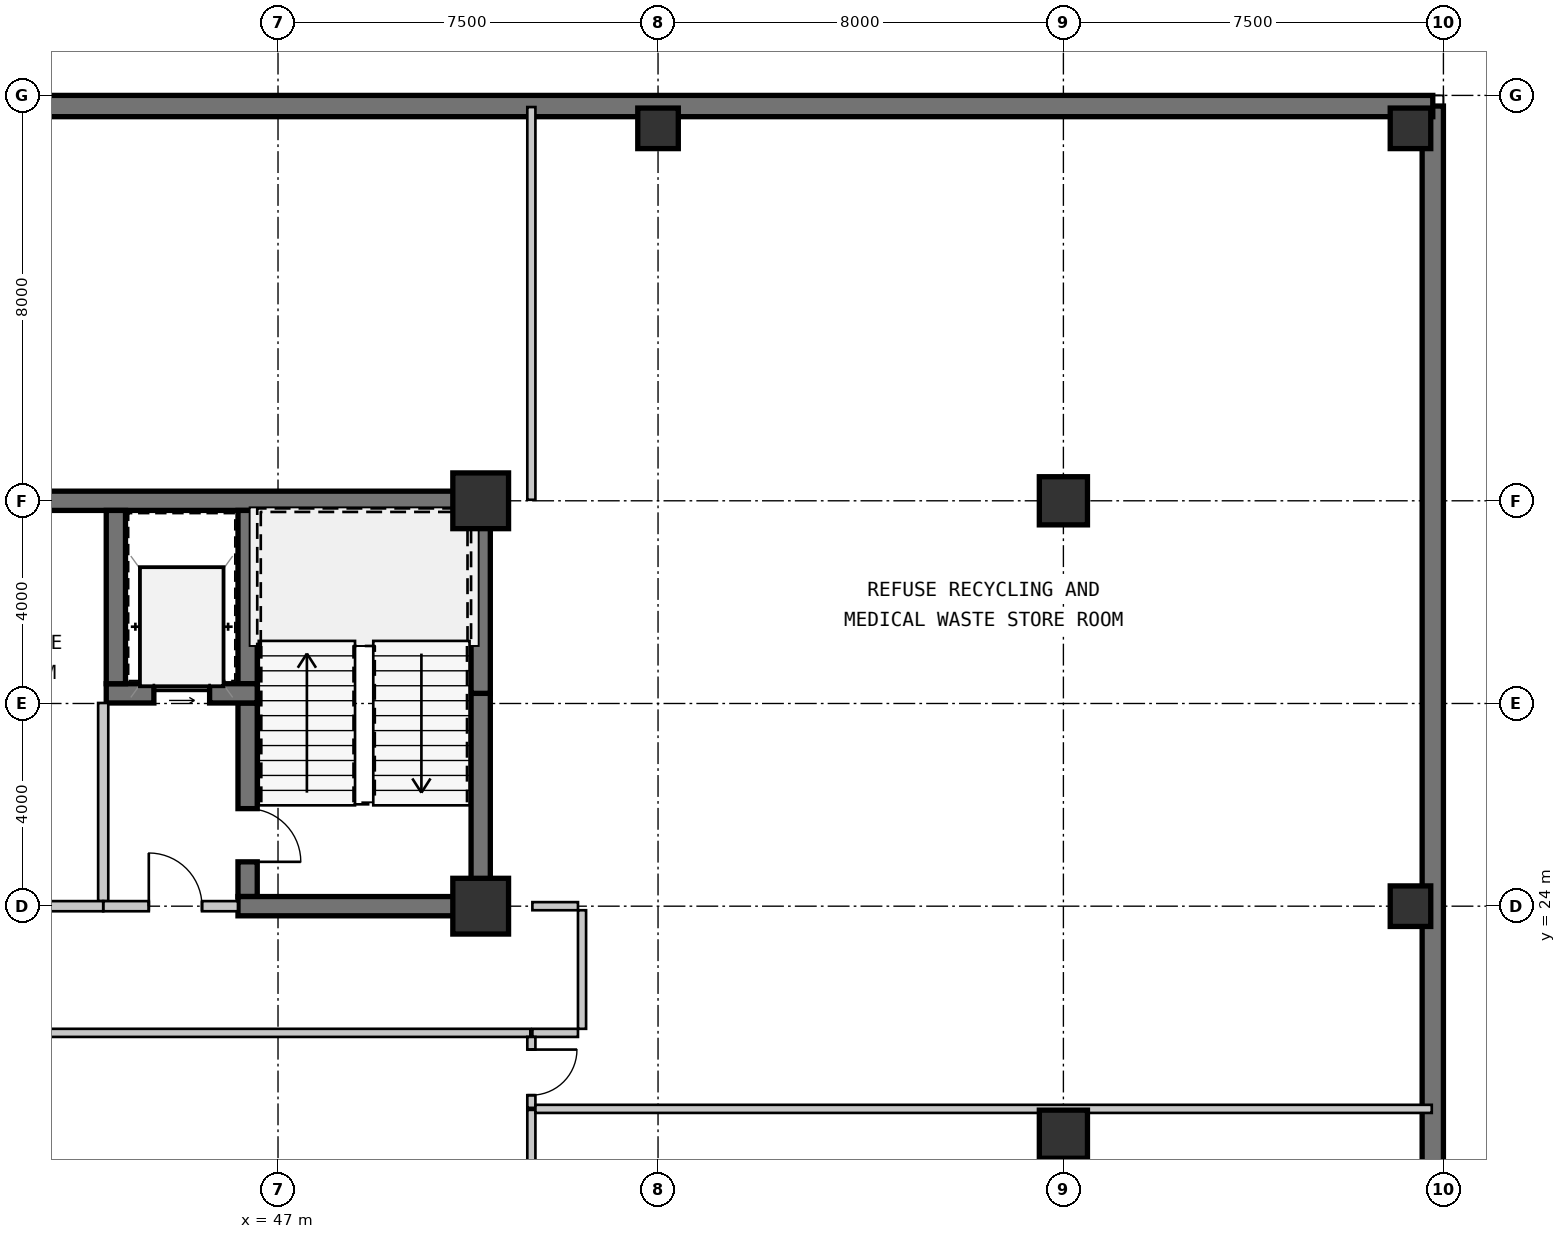
"""IFC4 building model, lengths in metres.
Left out: names, types, materials, properties, quantities, classifications, styles, units other than length and angle.
Written with IfcOpenShell. Run it as: python <this file> out.ifc"""

import sys

from ifc_helpers import new_model, si_unit, direction, frame, frame_2d, origin, origin_2d, place, context, subcontext, project, spatial, rectangle, extrude, source, transform, mapped, element, fill, save


model = new_model("IFC4")
c1 = context("Model", 3, precision=1e-05, world=origin(), true_north=direction((0.0, 1.0)))
c2 = subcontext(c1, "Body", "Model", "MODEL_VIEW")
j1 = project(units=[si_unit("LENGTHUNIT", "METRE"), si_unit("PLANEANGLEUNIT", "RADIAN")], contexts=[c1])
p1 = place(None, origin())
s1 = spatial("IfcSite", under=j1, at=p1, CompositionType="ELEMENT")
p2 = place(p1, origin())
s2 = spatial("IfcBuilding", under=s1, at=p2, CompositionType="ELEMENT")
p3 = place(p2, frame((0.0, 0.0, -4.0)))
s3 = spatial("IfcBuildingStorey", under=s2, at=p3, CompositionType="ELEMENT", Elevation=-4.0)
m1 = source(origin(), c2, "Body", "SweptSolid", [
    extrude(rectangle(XDim=1.1, YDim=1.1, at=origin_2d()), origin(), (0.0, 0.0, 1.0), 4.0),
])
for number, where, z_axis, x_axis in (
    (1, (51.0, 24.0, 0.0), (0.0, 0.0, 1.0), (1.0, 0.0, 0.0)),
    (2, (51.0, 32.0, 0.0), (0.0, 0.0, 1.0), (1.0, 0.0, 0.0)),
):
    element("IfcColumn", number, at=place(p3, frame(where, z_axis=z_axis, x_axis=x_axis)), inside=s3, PredefinedType="COLUMN", context=c2, shape_type="MappedRepresentation", body=[
        mapped(m1, transform((0.0, 0.0, 0.0), scale=1.0)),
    ])
m2 = source(origin(), c2, "Body", "SweptSolid", [
    extrude(rectangle(XDim=0.95, YDim=0.95, at=origin_2d()), origin(), (0.0, 0.0, 1.0), 4.0),
])
for number, where, z_axis, x_axis in (
    (3, (62.5, 19.5, 0.0), (0.0, 0.0, 1.0), (1.0, 0.0, 0.0)),
    (4, (62.5, 32.0, 0.0), (0.0, 0.0, 1.0), (1.0, 0.0, 0.0)),
):
    element("IfcColumn", number, at=place(p3, frame(where, z_axis=z_axis, x_axis=x_axis)), inside=s3, PredefinedType="COLUMN", context=c2, shape_type="MappedRepresentation", body=[
        mapped(m2, transform((0.0, 0.0, 0.0), scale=1.0)),
    ])
m3 = source(origin(), c2, "Body", "SweptSolid", [
    extrude(rectangle(XDim=0.8, YDim=0.8, at=origin_2d()), origin(), (0.0, 0.0, 1.0), 4.0),
])
for number, where, z_axis, x_axis in (
    (5, (69.35, 24.0, 0.0), (0.0, 0.0, 1.0), (1.0, 0.0, 0.0)),
    (6, (69.35, 39.35, 0.0), (0.0, 0.0, 1.0), (1.0, 0.0, 0.0)),
    (7, (54.5, 39.35, 0.0), (0.0, 0.0, 1.0), (1.0, 0.0, 0.0)),
):
    element("IfcColumn", number, at=place(p3, frame(where, z_axis=z_axis, x_axis=x_axis)), inside=s3, PredefinedType="COLUMN", context=c2, shape_type="MappedRepresentation", body=[
        mapped(m3, transform((0.0, 0.0, 0.0), scale=1.0)),
    ])
m4 = source(origin(), c2, "Body", "SweptSolid", [
    extrude(rectangle(XDim=39.58, YDim=0.42, at=frame_2d((19.79, 0.0))), origin(), (0.0, 0.0, 1.0), 3.74),
])
p4 = place(p3, frame((69.79, 0.21, 0.0), z_axis=(0.0, 0.0, 1.0), x_axis=(0.0, 1.0, 0.0)))
e8 = element("IfcWall", 8, at=p4, inside=s3, PredefinedType="SOLIDWALL", context=c2, shape_type="MappedRepresentation", body=[
    mapped(m4, transform((0.0, 0.0, 0.0), scale=1.0)),
])
m5 = source(origin(), c2, "Body", "SweptSolid", [
    extrude(rectangle(XDim=69.58, YDim=0.42, at=frame_2d((34.79, 0.0))), origin(), (0.0, 0.0, 1.0), 3.74),
])
p5 = place(p3, frame((69.79, 39.79, 0.0), z_axis=(0.0, 0.0, 1.0), x_axis=(-1.0, 0.0, 0.0)))
e9 = element("IfcWall", 9, at=p5, inside=s3, PredefinedType="SOLIDWALL", context=c2, shape_type="MappedRepresentation", body=[
    mapped(m5, transform((0.0, 0.0, 0.0), scale=1.0)),
])
m6 = source(origin(), c2, "Body", "SweptSolid", [
    extrude(rectangle(XDim=11.99, YDim=0.38, at=frame_2d((5.995, 0.0))), origin(), (0.0, 0.0, 1.0), 3.74),
])
p6 = place(p3, frame((39.2, 32.0, 0.0), z_axis=(0.0, 0.0, 1.0), x_axis=(1.0, 0.0, 0.0)))
e10 = element("IfcWall", 10, at=p6, inside=s3, PredefinedType="SHEAR", context=c2, shape_type="MappedRepresentation", body=[
    mapped(m6, transform((0.0, 0.0, 0.0), scale=1.0)),
])
m7 = source(origin(), c2, "Body", "SweptSolid", [
    extrude(rectangle(XDim=4.01, YDim=0.38, at=frame_2d((2.005, 0.0))), origin(), (0.0, 0.0, 1.0), 3.74),
])
p7 = place(p3, frame((51.0, 24.19, 0.0), z_axis=(0.0, 0.0, 1.0), x_axis=(0.0, 1.0, 0.0)))
e11 = element("IfcWall", 11, at=p7, inside=s3, PredefinedType="SHEAR", context=c2, shape_type="MappedRepresentation", body=[
    mapped(m7, transform((0.0, 0.0, 0.0), scale=1.0)),
])
m8 = source(origin(), c2, "Body", "SweptSolid", [
    extrude(rectangle(XDim=3.61, YDim=0.38, at=frame_2d((1.805, 0.0))), origin(), (0.0, 0.0, 1.0), 3.74),
])
p8 = place(p3, frame((51.0, 28.2, 0.0), z_axis=(0.0, 0.0, 1.0), x_axis=(0.0, 1.0, 0.0)))
e12 = element("IfcWall", 12, at=p8, inside=s3, PredefinedType="SHEAR", context=c2, shape_type="MappedRepresentation", body=[
    mapped(m8, transform((0.0, 0.0, 0.0), scale=1.0)),
])
m9 = source(origin(), c2, "Body", "SweptSolid", [
    extrude(rectangle(XDim=3.42, YDim=0.38, at=frame_2d((1.71, 0.0))), origin(), (0.0, 0.0, 1.0), 3.74),
])
p9 = place(p3, frame((46.4, 31.81, 0.0), z_axis=(0.0, 0.0, 1.0), x_axis=(0.0, -1.0, 0.0)))
e13 = element("IfcWall", 13, at=p9, inside=s3, PredefinedType="SHEAR", context=c2, shape_type="MappedRepresentation", body=[
    mapped(m9, transform((0.0, 0.0, 0.0), scale=1.0)),
])
m10 = source(origin(), c2, "Body", "SweptSolid", [
    extrude(rectangle(XDim=3.82, YDim=0.38, at=frame_2d((1.91, 0.0))), origin(), (0.0, 0.0, 1.0), 3.74),
])
p10 = place(p3, frame((46.4, 28.01, 0.0), z_axis=(0.0, 0.0, 1.0), x_axis=(0.0, -1.0, 0.0)))
e14 = element("IfcWall", 14, at=p10, inside=s3, PredefinedType="SHEAR", context=c2, shape_type="MappedRepresentation", body=[
    mapped(m10, transform((0.0, 0.0, 0.0), scale=1.0)),
])
m11 = source(origin(), c2, "Body", "SweptSolid", [
    extrude(rectangle(XDim=1.05, YDim=2.1, at=frame_2d((0.525, 1.05))), frame((0.0, 0.2, 0.0), z_axis=(0.0, -1.0, 0.0), x_axis=(1.0, 0.0, 0.0)), (0.0, 0.0, 1.0), 0.4),
])
p11 = place(p10, frame((2.085, 0.0, 0.0)))
e15 = element("IfcOpeningElement", 15, at=p11, cuts=e14, PredefinedType="OPENING", context=c2, shape_type="MappedRepresentation", body=[
    mapped(m11, transform((0.0, 0.0, 0.0), scale=1.0)),
])
m12 = source(origin(), c2, "Body", "SweptSolid", [
    extrude(rectangle(XDim=4.98, YDim=0.38, at=frame_2d((2.49, 0.0))), origin(), (0.0, 0.0, 1.0), 3.74),
])
p12 = place(p3, frame((46.21, 24.0, 0.0), z_axis=(0.0, 0.0, 1.0), x_axis=(1.0, 0.0, 0.0)))
e16 = element("IfcWall", 16, at=p12, inside=s3, PredefinedType="SHEAR", context=c2, shape_type="MappedRepresentation", body=[
    mapped(m12, transform((0.0, 0.0, 0.0), scale=1.0)),
])
m13 = source(origin(), c2, "Body", "SweptSolid", [
    extrude(rectangle(XDim=2.98, YDim=0.38, at=frame_2d((1.49, 0.0))), origin(), (0.0, 0.0, 1.0), 3.74),
])
p13 = place(p3, frame((43.61, 28.2, 0.0), z_axis=(0.0, 0.0, 1.0), x_axis=(1.0, 0.0, 0.0)))
e17 = element("IfcWall", 17, at=p13, inside=s3, PredefinedType="SHEAR", context=c2, shape_type="MappedRepresentation", body=[
    mapped(m13, transform((0.0, 0.0, 0.0), scale=1.0)),
])
m14 = source(origin(), c2, "Body", "SweptSolid", [
    extrude(rectangle(XDim=1.1, YDim=2.15, at=frame_2d((0.55, 1.075))), frame((0.0, 0.2, 0.0), z_axis=(0.0, -1.0, 0.0), x_axis=(1.0, 0.0, 0.0)), (0.0, 0.0, 1.0), 0.4),
])
p14 = place(p13, frame((0.94, 0.0, 0.0)))
e18 = element("IfcOpeningElement", 18, at=p14, cuts=e17, PredefinedType="OPENING", context=c2, shape_type="MappedRepresentation", body=[
    mapped(m14, transform((0.0, 0.0, 0.0), scale=1.0)),
])
p15 = place(p3, frame((43.8, 31.81, 0.0), z_axis=(0.0, 0.0, 1.0), x_axis=(0.0, -1.0, 0.0)))
e19 = element("IfcWall", 19, at=p15, inside=s3, PredefinedType="SHEAR", context=c2, shape_type="MappedRepresentation", body=[
    mapped(m9, transform((0.0, 0.0, 0.0), scale=1.0)),
])
m15 = source(origin(), c2, "Body", "SweptSolid", [
    extrude(rectangle(XDim=3.91, YDim=0.2, at=frame_2d((1.955, 0.0))), origin(), (0.0, 0.0, 1.0), 3.74),
])
p16 = place(p3, frame((43.55, 28.01, 0.0), z_axis=(0.0, 0.0, 1.0), x_axis=(0.0, -1.0, 0.0)))
e20 = element("IfcWall", 20, at=p16, inside=s3, PredefinedType="SOLIDWALL", context=c2, shape_type="MappedRepresentation", body=[
    mapped(m15, transform((0.0, 0.0, 0.0), scale=1.0)),
])
m16 = source(origin(), c2, "Body", "SweptSolid", [
    extrude(rectangle(XDim=2.66, YDim=0.2, at=frame_2d((1.33, 0.0))), origin(), (0.0, 0.0, 1.0), 3.207),
])
p17 = place(p3, frame((43.55, 24.0, 0.0), z_axis=(0.0, 0.0, 1.0), x_axis=(1.0, 0.0, 0.0)))
e21 = element("IfcWall", 21, at=p17, inside=s3, PredefinedType="SOLIDWALL", context=c2, shape_type="MappedRepresentation", body=[
    mapped(m16, transform((0.0, 0.0, 0.0), scale=1.0)),
])
m17 = source(origin(), c2, "Body", "SweptSolid", [
    extrude(rectangle(XDim=1.05, YDim=2.1, at=frame_2d((0.525, 1.05))), frame((0.0, 0.11, 0.0), z_axis=(0.0, -1.0, 0.0), x_axis=(1.0, 0.0, 0.0)), (0.0, 0.0, 1.0), 0.22),
])
p18 = place(p17, frame((0.9, 0.0, 0.0)))
e22 = element("IfcOpeningElement", 22, at=p18, cuts=e21, PredefinedType="OPENING", context=c2, shape_type="MappedRepresentation", body=[
    mapped(m17, transform((0.0, 0.0, 0.0), scale=1.0)),
])
m18 = source(origin(), c2, "Body", "SweptSolid", [
    extrude(rectangle(XDim=4.35, YDim=0.2, at=frame_2d((2.175, 0.0))), origin(), (0.0, 0.0, 1.0), 3.207),
])
p19 = place(p3, frame((43.55, 24.0, 0.0), z_axis=(0.0, 0.0, 1.0), x_axis=(-1.0, 0.0, 0.0)))
e23 = element("IfcWall", 23, at=p19, inside=s3, PredefinedType="SOLIDWALL", context=c2, shape_type="MappedRepresentation", body=[
    mapped(m18, transform((0.0, 0.0, 0.0), scale=1.0)),
])
p20 = place(p19, frame((1.65, 0.0, 0.0)))
e24 = element("IfcOpeningElement", 24, at=p20, cuts=e23, PredefinedType="OPENING", context=c2, shape_type="MappedRepresentation", body=[
    mapped(m17, transform((0.0, 0.0, 0.0), scale=1.0)),
])
m19 = source(origin(), c2, "Body", "SweptSolid", [
    extrude(rectangle(XDim=36.959, YDim=0.16, at=frame_2d((18.48, 0.0))), origin(), (0.0, 0.0, 1.0), 3.74),
])
p21 = place(p3, frame((51.98, 21.5, 0.0), z_axis=(0.0, 0.0, 1.0), x_axis=(-1.0, 0.0, 0.0)))
e25 = element("IfcWall", 25, at=p21, inside=s3, PredefinedType="PARTITIONING", context=c2, shape_type="MappedRepresentation", body=[
    mapped(m19, transform((0.0, 0.0, 0.0), scale=1.0)),
])
m20 = source(origin(), c2, "Body", "SweptSolid", [
    extrude(rectangle(XDim=1.05, YDim=2.1, at=frame_2d((0.525, 1.05))), frame((0.0, 0.09, 0.0), z_axis=(0.0, -1.0, 0.0), x_axis=(1.0, 0.0, 0.0)), (0.0, 0.0, 1.0), 0.18),
])
p22 = place(p21, frame((17.955, 0.0, 0.0)))
e26 = element("IfcOpeningElement", 26, at=p22, cuts=e25, PredefinedType="OPENING", context=c2, shape_type="MappedRepresentation", body=[
    mapped(m20, transform((0.0, 0.0, 0.0), scale=1.0)),
])
m21 = source(origin(), c2, "Body", "SweptSolid", [
    extrude(rectangle(XDim=2.34, YDim=0.16, at=frame_2d((1.17, 0.0))), origin(), (0.0, 0.0, 1.0), 3.74),
])
p23 = place(p3, frame((53.0, 23.92, 0.0), z_axis=(0.0, 0.0, 1.0), x_axis=(0.0, -1.0, 0.0)))
e27 = element("IfcWall", 27, at=p23, inside=s3, PredefinedType="PARTITIONING", context=c2, shape_type="MappedRepresentation", body=[
    mapped(m21, transform((0.0, 0.0, 0.0), scale=1.0)),
])
m22 = source(origin(), c2, "Body", "SweptSolid", [
    extrude(rectangle(XDim=0.9, YDim=0.16, at=frame_2d((0.45, 0.0))), origin(), (0.0, 0.0, 1.0), 3.74),
])
for number, where, z_axis, x_axis in (
    (28, (52.92, 21.5, 0.0), (0.0, 0.0, 1.0), (-1.0, 0.0, 0.0)),
    (29, (52.02, 24.0, 0.0), (0.0, 0.0, 1.0), (1.0, 0.0, 0.0)),
):
    element("IfcWall", number, at=place(p3, frame(where, z_axis=z_axis, x_axis=x_axis)), inside=s3, PredefinedType="PARTITIONING", context=c2, shape_type="MappedRepresentation", body=[
        mapped(m22, transform((0.0, 0.0, 0.0), scale=1.0)),
    ])
m23 = source(origin(), c2, "Body", "SweptSolid", [
    extrude(rectangle(XDim=5.354, YDim=0.16, at=frame_2d((2.677, 0.0))), origin(), (0.0, 0.0, 1.0), 3.74),
])
p24 = place(p3, frame((52.0, 19.98, 0.0), z_axis=(0.0, 0.0, 1.0), x_axis=(0.0, -1.0, 0.0)))
e30 = element("IfcWall", 30, at=p24, inside=s3, PredefinedType="PARTITIONING", context=c2, shape_type="MappedRepresentation", body=[
    mapped(m23, transform((0.0, 0.0, 0.0), scale=1.0)),
])
m24 = source(origin(), c2, "Body", "SweptSolid", [
    extrude(rectangle(XDim=1.4, YDim=0.16, at=frame_2d((0.7, 0.0))), origin(), (0.0, 0.0, 1.0), 3.74),
])
p25 = place(p3, frame((52.0, 21.42, 0.0), z_axis=(0.0, 0.0, 1.0), x_axis=(0.0, -1.0, 0.0)))
e31 = element("IfcWall", 31, at=p25, inside=s3, PredefinedType="PARTITIONING", context=c2, shape_type="MappedRepresentation", body=[
    mapped(m24, transform((0.0, 0.0, 0.0), scale=1.0)),
])
m25 = source(origin(), c2, "Body", "SweptSolid", [
    extrude(rectangle(XDim=0.9, YDim=2.1, at=frame_2d((0.45, 1.05))), frame((0.0, 0.09, 0.0), z_axis=(0.0, -1.0, 0.0), x_axis=(1.0, 0.0, 0.0)), (0.0, 0.0, 1.0), 0.18),
])
p26 = place(p25, frame((0.25, 0.0, 0.0)))
e32 = element("IfcOpeningElement", 32, at=p26, cuts=e31, PredefinedType="OPENING", context=c2, shape_type="MappedRepresentation", body=[
    mapped(m25, transform((0.0, 0.0, 0.0), scale=1.0)),
])
m26 = source(origin(), c2, "Body", "SweptSolid", [
    extrude(rectangle(XDim=17.69, YDim=0.16, at=frame_2d((8.845, 0.0))), origin(), (0.0, 0.0, 1.0), 3.74),
])
p27 = place(p3, frame((52.08, 20.0, 0.0), z_axis=(0.0, 0.0, 1.0), x_axis=(1.0, 0.0, 0.0)))
e33 = element("IfcWall", 33, at=p27, inside=s3, PredefinedType="PARTITIONING", context=c2, shape_type="MappedRepresentation", body=[
    mapped(m26, transform((0.0, 0.0, 0.0), scale=1.0)),
])
m27 = source(origin(), c2, "Body", "SweptSolid", [
    extrude(rectangle(XDim=7.75, YDim=0.16, at=frame_2d((3.875, 0.0))), origin(), (0.0, 0.0, 1.0), 3.74),
])
p28 = place(p3, frame((52.0, 32.02, 0.0), z_axis=(0.0, 0.0, 1.0), x_axis=(0.0, 1.0, 0.0)))
e34 = element("IfcWall", 34, at=p28, inside=s3, PredefinedType="PARTITIONING", context=c2, shape_type="MappedRepresentation", body=[
    mapped(m27, transform((0.0, 0.0, 0.0), scale=1.0)),
])
m28 = source(origin(), c2, "Body", "SweptSolid", [
    extrude(rectangle(XDim=1.05, YDim=2.1, at=frame_2d((0.525, 1.05))), frame((0.0, 0.025, 0.0), z_axis=(0.0, -1.0, 0.0), x_axis=(1.0, 0.0, 0.0)), (0.0, 0.0, 1.0), 0.05),
])
p29 = place(p11, origin())
e35 = element("IfcDoor", 35, at=p29, inside=s3, OperationType="SINGLE_SWING_RIGHT", PredefinedType="DOOR", context=c2, shape_type="MappedRepresentation", body=[
    mapped(m28, transform((0.0, 0.0, 0.0), scale=1.0)),
])
fill(e15, e35)
m29 = source(origin(), c2, "Body", "SweptSolid", [
    extrude(rectangle(XDim=1.1, YDim=2.15, at=frame_2d((0.55, 1.075))), frame((0.0, 0.025, 0.0), z_axis=(0.0, -1.0, 0.0), x_axis=(1.0, 0.0, 0.0)), (0.0, 0.0, 1.0), 0.05),
])
p30 = place(p14, origin())
e36 = element("IfcDoor", 36, at=p30, inside=s3, OperationType="SLIDING_TO_LEFT", PredefinedType="DOOR", context=c2, shape_type="MappedRepresentation", body=[
    mapped(m29, transform((0.0, 0.0, 0.0), scale=1.0)),
])
fill(e18, e36)
p31 = place(p18, origin())
e37 = element("IfcDoor", 37, at=p31, inside=s3, OperationType="SINGLE_SWING_LEFT", PredefinedType="DOOR", context=c2, shape_type="MappedRepresentation", body=[
    mapped(m28, transform((0.0, 0.0, 0.0), scale=1.0)),
])
fill(e22, e37)
m30 = source(origin(), c2, "Body", "SweptSolid", [
    extrude(rectangle(XDim=0.9, YDim=2.1, at=frame_2d((0.45, 1.05))), frame((0.0, 0.025, 0.0), z_axis=(0.0, -1.0, 0.0), x_axis=(1.0, 0.0, 0.0)), (0.0, 0.0, 1.0), 0.05),
])
p32 = place(p26, origin())
e38 = element("IfcDoor", 38, at=p32, inside=s3, OperationType="SINGLE_SWING_LEFT", PredefinedType="GATE", context=c2, shape_type="MappedRepresentation", body=[
    mapped(m30, transform((0.0, 0.0, 0.0), scale=1.0)),
])
fill(e32, e38)
save(model, sys.argv[1])
